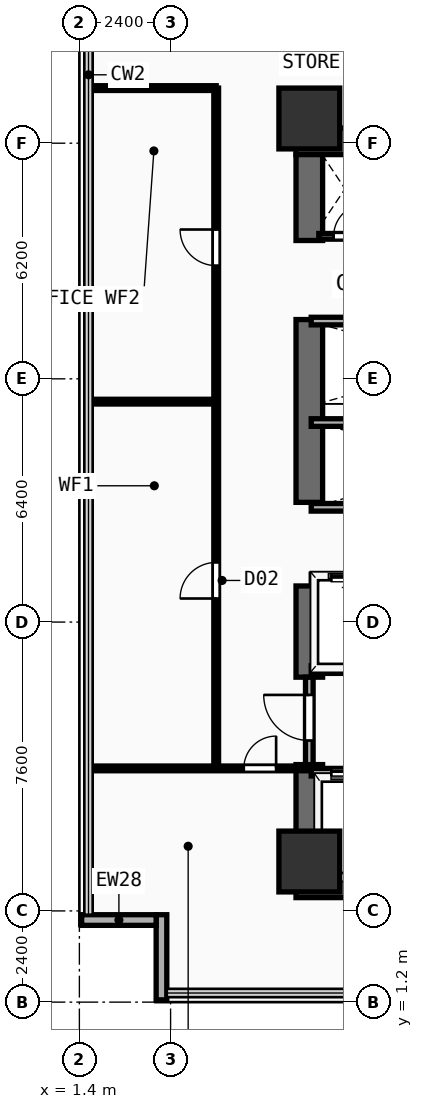
"""IFC4 building model, lengths in metres.
Left out: names, types, materials, properties, quantities, classifications, styles, units other than length and angle.
Written with IfcOpenShell. Run it as: python <this file> out.ifc"""

import sys

from ifc_helpers import new_model, si_unit, direction, frame, frame_2d, origin, origin_2d, place, context, subcontext, project, spatial, rectangle, extrude, element, fill, save


model = new_model("IFC4")
c1 = context("Model", 3, precision=1e-05, world=origin(), true_north=direction((0.0, 1.0)))
c2 = subcontext(c1, "Body", "Model", "MODEL_VIEW")
j1 = project(units=[si_unit("LENGTHUNIT", "METRE"), si_unit("PLANEANGLEUNIT", "RADIAN")], contexts=[c1])
p1 = place(None, origin())
s1 = spatial("IfcSite", under=j1, at=p1, CompositionType="ELEMENT")
p2 = place(p1, origin())
s2 = spatial("IfcBuilding", under=s1, at=p2, CompositionType="ELEMENT")
p3 = place(p2, frame((0.0, 0.0, 48.6)))
s3 = spatial("IfcBuildingStorey", under=s2, at=p3, CompositionType="ELEMENT", Elevation=48.6)
for number, where, z_axis, x_axis in (
    (1, (7.1, 4.3, 0.0), (0.0, 0.0, 1.0), (1.0, 0.0, 0.0)),
    (2, (7.1, 23.85, 0.0), (0.0, 0.0, 1.0), (1.0, 0.0, 0.0)),
):
    element("IfcWall", number, at=place(p3, frame(where, z_axis=z_axis, x_axis=x_axis)), inside=s3, PredefinedType="SHEAR", context=c2, shape_type="SweptSolid", body=[
        extrude(rectangle(XDim=14.05, YDim=0.7, at=frame_2d((7.025, 0.0))), origin(), (0.0, 0.0, 1.0), 3.54),
    ])
p4 = place(p3, frame((7.45, 4.65, 0.0), z_axis=(0.0, 0.0, 1.0), x_axis=(0.0, 1.0, 0.0)))
e3 = element("IfcWall", 3, at=p4, inside=s3, PredefinedType="SHEAR", context=c2, shape_type="SweptSolid", body=[
    extrude(rectangle(XDim=2.8, YDim=0.7, at=frame_2d((1.4, 0.0))), origin(), (0.0, 0.0, 1.0), 3.54),
])
p5 = place(p3, frame((7.45, 9.75, 0.0), z_axis=(0.0, 0.0, 1.0), x_axis=(0.0, 1.0, 0.0)))
e4 = element("IfcWall", 4, at=p5, inside=s3, PredefinedType="SHEAR", context=c2, shape_type="SweptSolid", body=[
    extrude(rectangle(XDim=2.4, YDim=0.7, at=frame_2d((1.2, 0.0))), origin(), (0.0, 0.0, 1.0), 3.54),
])
p6 = place(p3, frame((7.45, 14.35, 0.0), z_axis=(0.0, 0.0, 1.0), x_axis=(0.0, 1.0, 0.0)))
e5 = element("IfcWall", 5, at=p6, inside=s3, PredefinedType="SHEAR", context=c2, shape_type="SweptSolid", body=[
    extrude(rectangle(XDim=4.81, YDim=0.7, at=frame_2d((2.405, 0.0))), origin(), (0.0, 0.0, 1.0), 3.54),
])
p7 = place(p3, frame((7.45, 21.24, 0.0), z_axis=(0.0, 0.0, 1.0), x_axis=(0.0, 1.0, 0.0)))
e6 = element("IfcWall", 6, at=p7, inside=s3, PredefinedType="SHEAR", context=c2, shape_type="SweptSolid", body=[
    extrude(rectangle(XDim=2.26, YDim=0.7, at=frame_2d((1.13, 0.0))), origin(), (0.0, 0.0, 1.0), 3.54),
])
for number, where, z_axis, x_axis in (
    (7, (7.45, 4.9, 0.0), (0.0, 0.0, 1.0), (1.0, 0.0, 0.0)),
    (8, (7.45, 24.45, 0.0), (0.0, 0.0, 1.0), (1.0, 0.0, 0.0)),
):
    element("IfcColumn", number, at=place(p3, frame(where, z_axis=z_axis, x_axis=x_axis)), inside=s3, PredefinedType="COLUMN", context=c2, shape_type="SweptSolid", body=[
        extrude(rectangle(XDim=1.6, YDim=1.6, at=origin_2d()), origin(), (0.0, 0.0, 1.0), 3.54),
    ])
p8 = place(p3, frame((3.56, 1.26, 0.0), z_axis=(0.0, 0.0, 1.0), x_axis=(0.0, 1.0, 0.0)))
e9 = element("IfcWall", 9, at=p8, inside=s3, PredefinedType="SOLIDWALL", context=c2, shape_type="SweptSolid", body=[
    extrude(rectangle(XDim=2.24, YDim=0.28, at=frame_2d((1.12, 0.0))), origin(), (0.0, 0.0, 1.0), 3.54),
])
p9 = place(p3, frame((1.46, 3.36, 0.0), z_axis=(0.0, 0.0, 1.0), x_axis=(1.0, 0.0, 0.0)))
e10 = element("IfcWall", 10, at=p9, inside=s3, PredefinedType="SOLIDWALL", context=c2, shape_type="SweptSolid", body=[
    extrude(rectangle(XDim=1.96, YDim=0.28, at=frame_2d((0.98, 0.0))), origin(), (0.0, 0.0, 1.0), 3.54),
])
p10 = place(p3, frame((7.5, 7.25, 0.0), z_axis=(0.0, 0.0, 1.0), x_axis=(1.0, 0.0, 0.0)))
e11 = element("IfcWall", 11, at=p10, inside=s3, PredefinedType="PARTITIONING", context=c2, shape_type="SweptSolid", body=[
    extrude(rectangle(XDim=8.35, YDim=0.2, at=frame_2d((4.175, 0.0))), origin(), (0.0, 0.0, 1.0), 3.54),
])
p11 = place(p10, frame((0.53, 0.0, 0.0)))
e12 = element("IfcOpeningElement", 12, at=p11, cuts=e11, PredefinedType="OPENING", context=c2, shape_type="SweptSolid", body=[
    extrude(rectangle(XDim=1.1, YDim=2.2, at=frame_2d((0.55, 1.1))), frame((0.0, 0.11, 0.0), z_axis=(0.0, -1.0, 0.0), x_axis=(1.0, 0.0, 0.0)), (0.0, 0.0, 1.0), 0.22),
])
p12 = place(p10, frame((2.37, 0.0, 0.0)))
e13 = element("IfcOpeningElement", 13, at=p12, cuts=e11, PredefinedType="OPENING", context=c2, shape_type="SweptSolid", body=[
    extrude(rectangle(XDim=1.1, YDim=2.2, at=frame_2d((0.55, 1.1))), frame((0.0, 0.11, 0.0), z_axis=(0.0, -1.0, 0.0), x_axis=(1.0, 0.0, 0.0)), (0.0, 0.0, 1.0), 0.22),
])
p13 = place(p10, frame((4.33, 0.0, 0.0)))
e14 = element("IfcOpeningElement", 14, at=p13, cuts=e11, PredefinedType="OPENING", context=c2, shape_type="SweptSolid", body=[
    extrude(rectangle(XDim=1.1, YDim=2.2, at=frame_2d((0.55, 1.1))), frame((0.0, 0.11, 0.0), z_axis=(0.0, -1.0, 0.0), x_axis=(1.0, 0.0, 0.0)), (0.0, 0.0, 1.0), 0.22),
])
p14 = place(p10, frame((6.5, 0.0, 0.0)))
e15 = element("IfcOpeningElement", 15, at=p14, cuts=e11, PredefinedType="OPENING", context=c2, shape_type="SweptSolid", body=[
    extrude(rectangle(XDim=1.1, YDim=2.2, at=frame_2d((0.55, 1.1))), frame((0.0, 0.11, 0.0), z_axis=(0.0, -1.0, 0.0), x_axis=(1.0, 0.0, 0.0)), (0.0, 0.0, 1.0), 0.22),
])
p15 = place(p3, frame((7.5, 9.95, 0.0), z_axis=(0.0, 0.0, 1.0), x_axis=(1.0, 0.0, 0.0)))
e16 = element("IfcWall", 16, at=p15, inside=s3, PredefinedType="PARTITIONING", context=c2, shape_type="SweptSolid", body=[
    extrude(rectangle(XDim=8.35, YDim=0.2, at=frame_2d((4.175, 0.0))), origin(), (0.0, 0.0, 1.0), 3.54),
])
p16 = place(p3, frame((7.45, 7.45, 0.0), z_axis=(0.0, 0.0, 1.0), x_axis=(0.0, 1.0, 0.0)))
e17 = element("IfcWall", 17, at=p16, inside=s3, PredefinedType="PARTITIONING", context=c2, shape_type="SweptSolid", body=[
    extrude(rectangle(XDim=2.3, YDim=0.2, at=frame_2d((1.15, 0.0))), origin(), (0.0, 0.0, 1.0), 2.52),
])
p17 = place(p16, frame((0.633, 0.0, 0.0)))
e18 = element("IfcOpeningElement", 18, at=p17, cuts=e17, PredefinedType="OPENING", context=c2, shape_type="SweptSolid", body=[
    extrude(rectangle(XDim=1.2, YDim=2.25, at=frame_2d((0.6, 1.125))), frame((0.0, 0.11, 0.0), z_axis=(0.0, -1.0, 0.0), x_axis=(1.0, 0.0, 0.0)), (0.0, 0.0, 1.0), 0.22),
])
p18 = place(p3, frame((7.5, 12.36, 0.0), z_axis=(0.0, 0.0, 1.0), x_axis=(1.0, 0.0, 0.0)))
e19 = element("IfcWall", 19, at=p18, inside=s3, PredefinedType="PARTITIONING", context=c2, shape_type="SweptSolid", body=[
    extrude(rectangle(XDim=7.85, YDim=0.2, at=frame_2d((3.925, 0.0))), origin(), (0.0, 0.0, 1.0), 3.54),
])
p19 = place(p18, frame((0.53, 0.0, 0.0)))
e20 = element("IfcOpeningElement", 20, at=p19, cuts=e19, PredefinedType="OPENING", context=c2, shape_type="SweptSolid", body=[
    extrude(rectangle(XDim=1.1, YDim=2.2, at=frame_2d((0.55, 1.1))), frame((0.0, 0.11, 0.0), z_axis=(0.0, -1.0, 0.0), x_axis=(1.0, 0.0, 0.0)), (0.0, 0.0, 1.0), 0.22),
])
p20 = place(p18, frame((2.42, 0.0, 0.0)))
e21 = element("IfcOpeningElement", 21, at=p20, cuts=e19, PredefinedType="OPENING", context=c2, shape_type="SweptSolid", body=[
    extrude(rectangle(XDim=1.1, YDim=2.2, at=frame_2d((0.55, 1.1))), frame((0.0, 0.11, 0.0), z_axis=(0.0, -1.0, 0.0), x_axis=(1.0, 0.0, 0.0)), (0.0, 0.0, 1.0), 0.22),
])
p21 = place(p18, frame((4.31, 0.0, 0.0)))
e22 = element("IfcOpeningElement", 22, at=p21, cuts=e19, PredefinedType="OPENING", context=c2, shape_type="SweptSolid", body=[
    extrude(rectangle(XDim=1.1, YDim=2.2, at=frame_2d((0.55, 1.1))), frame((0.0, 0.11, 0.0), z_axis=(0.0, -1.0, 0.0), x_axis=(1.0, 0.0, 0.0)), (0.0, 0.0, 1.0), 0.22),
])
p22 = place(p18, frame((6.2, 0.0, 0.0)))
e23 = element("IfcOpeningElement", 23, at=p22, cuts=e19, PredefinedType="OPENING", context=c2, shape_type="SweptSolid", body=[
    extrude(rectangle(XDim=1.1, YDim=2.2, at=frame_2d((0.55, 1.1))), frame((0.0, 0.11, 0.0), z_axis=(0.0, -1.0, 0.0), x_axis=(1.0, 0.0, 0.0)), (0.0, 0.0, 1.0), 0.22),
])
for number, where, z_axis, x_axis in (
    (24, (7.5, 14.22, 0.0), (0.0, 0.0, 1.0), (1.0, 0.0, 0.0)),
    (25, (7.5, 16.45, 0.0), (0.0, 0.0, 1.0), (1.0, 0.0, 0.0)),
    (26, (7.5, 19.12, 0.0), (0.0, 0.0, 1.0), (1.0, 0.0, 0.0)),
):
    element("IfcWall", number, at=place(p3, frame(where, z_axis=z_axis, x_axis=x_axis)), inside=s3, PredefinedType="PARTITIONING", context=c2, shape_type="SweptSolid", body=[
        extrude(rectangle(XDim=7.85, YDim=0.2, at=frame_2d((3.925, 0.0))), origin(), (0.0, 0.0, 1.0), 3.54),
    ])
p23 = place(p3, frame((7.7, 21.35, 0.0), z_axis=(0.0, 0.0, 1.0), x_axis=(1.0, 0.0, 0.0)))
e27 = element("IfcWall", 27, at=p23, inside=s3, PredefinedType="PARTITIONING", context=c2, shape_type="SweptSolid", body=[
    extrude(rectangle(XDim=1.55, YDim=0.15, at=frame_2d((0.775, 0.0))), origin(), (0.0, 0.0, 1.0), 3.54),
])
p24 = place(p23, frame((0.39, 0.0, 0.0)))
e28 = element("IfcOpeningElement", 28, at=p24, cuts=e27, PredefinedType="OPENING", context=c2, shape_type="SweptSolid", body=[
    extrude(rectangle(XDim=0.85, YDim=2.15, at=frame_2d((0.425, 1.075))), frame((0.0, 0.085, 0.0), z_axis=(0.0, -1.0, 0.0), x_axis=(1.0, 0.0, 0.0)), (0.0, 0.0, 1.0), 0.17),
])
p25 = place(p3, frame((1.64, 7.35, 0.0), z_axis=(0.0, 0.0, 1.0), x_axis=(1.0, 0.0, 0.0)))
e29 = element("IfcWall", 29, at=p25, inside=s3, PredefinedType="PARTITIONING", context=c2, shape_type="SweptSolid", body=[
    extrude(rectangle(XDim=5.76, YDim=0.125, at=frame_2d((2.88, 0.0))), origin(), (0.0, 0.0, 1.0), 3.54),
])
p26 = place(p25, frame((4.087, 0.0, 0.0)))
e30 = element("IfcOpeningElement", 30, at=p26, cuts=e29, PredefinedType="OPENING", context=c2, shape_type="SweptSolid", body=[
    extrude(rectangle(XDim=0.85, YDim=2.15, at=frame_2d((0.425, 1.075))), frame((0.0, 0.073, 0.0), z_axis=(0.0, -1.0, 0.0), x_axis=(1.0, 0.0, 0.0)), (0.0, 0.0, 1.0), 0.145),
])
p27 = place(p3, frame((5.0, 7.5, 0.0), z_axis=(0.0, 0.0, 1.0), x_axis=(0.0, 1.0, 0.0)))
e31 = element("IfcWall", 31, at=p27, inside=s3, PredefinedType="PARTITIONING", context=c2, shape_type="SweptSolid", body=[
    extrude(rectangle(XDim=17.75, YDim=0.125, at=frame_2d((8.875, 0.0))), origin(), (0.0, 0.0, 1.0), 3.54),
])
p28 = place(p27, frame((4.32, 0.0, 0.0)))
e32 = element("IfcOpeningElement", 32, at=p28, cuts=e31, PredefinedType="OPENING", context=c2, shape_type="SweptSolid", body=[
    extrude(rectangle(XDim=0.95, YDim=2.15, at=frame_2d((0.475, 1.075))), frame((0.0, 0.073, 0.0), z_axis=(0.0, -1.0, 0.0), x_axis=(1.0, 0.0, 0.0)), (0.0, 0.0, 1.0), 0.145),
])
p29 = place(p27, frame((13.079, 0.0, 0.0)))
e33 = element("IfcOpeningElement", 33, at=p29, cuts=e31, PredefinedType="OPENING", context=c2, shape_type="SweptSolid", body=[
    extrude(rectangle(XDim=0.95, YDim=2.15, at=frame_2d((0.475, 1.075))), frame((0.0, 0.073, 0.0), z_axis=(0.0, -1.0, 0.0), x_axis=(1.0, 0.0, 0.0)), (0.0, 0.0, 1.0), 0.145),
])
for number, where, z_axis, x_axis in (
    (34, (1.64, 25.25, 0.0), (0.0, 0.0, 1.0), (1.0, 0.0, 0.0)),
    (35, (1.64, 17.0, 0.0), (0.0, 0.0, 1.0), (1.0, 0.0, 0.0)),
):
    element("IfcWall", number, at=place(p3, frame(where, z_axis=z_axis, x_axis=x_axis)), inside=s3, PredefinedType="PARTITIONING", context=c2, shape_type="SweptSolid", body=[
        extrude(rectangle(XDim=3.36, YDim=0.125, at=frame_2d((1.68, 0.0))), origin(), (0.0, 0.0, 1.0), 3.54),
    ])
p30 = place(p11, origin())
e36 = element("IfcDoor", 36, at=p30, inside=s3, OperationType="SLIDING_TO_LEFT", PredefinedType="DOOR", context=c2, shape_type="SweptSolid", body=[
    extrude(rectangle(XDim=1.1, YDim=2.2, at=frame_2d((0.55, 1.1))), frame((0.0, 0.025, 0.0), z_axis=(0.0, -1.0, 0.0), x_axis=(1.0, 0.0, 0.0)), (0.0, 0.0, 1.0), 0.05),
])
fill(e12, e36)
p31 = place(p17, frame((1.2, 0.0, 0.0), z_axis=(0.0, 0.0, 1.0), x_axis=(-1.0, 0.0, 0.0)))
e37 = element("IfcDoor", 37, at=p31, inside=s3, OperationType="SINGLE_SWING_LEFT", PredefinedType="DOOR", context=c2, shape_type="SweptSolid", body=[
    extrude(rectangle(XDim=1.2, YDim=2.25, at=frame_2d((0.6, 1.125))), frame((0.0, 0.025, 0.0), z_axis=(0.0, -1.0, 0.0), x_axis=(1.0, 0.0, 0.0)), (0.0, 0.0, 1.0), 0.05),
])
fill(e18, e37)
p32 = place(p19, origin())
e38 = element("IfcDoor", 38, at=p32, inside=s3, OperationType="SLIDING_TO_LEFT", PredefinedType="DOOR", context=c2, shape_type="SweptSolid", body=[
    extrude(rectangle(XDim=1.1, YDim=2.2, at=frame_2d((0.55, 1.1))), frame((0.0, 0.025, 0.0), z_axis=(0.0, -1.0, 0.0), x_axis=(1.0, 0.0, 0.0)), (0.0, 0.0, 1.0), 0.05),
])
fill(e20, e38)
p33 = place(p24, origin())
e39 = element("IfcDoor", 39, at=p33, inside=s3, OperationType="SINGLE_SWING_RIGHT", PredefinedType="DOOR", context=c2, shape_type="SweptSolid", body=[
    extrude(rectangle(XDim=0.85, YDim=2.15, at=frame_2d((0.425, 1.075))), frame((0.0, 0.025, 0.0), z_axis=(0.0, -1.0, 0.0), x_axis=(1.0, 0.0, 0.0)), (0.0, 0.0, 1.0), 0.05),
])
fill(e28, e39)
p34 = place(p26, origin())
e40 = element("IfcDoor", 40, at=p34, inside=s3, OperationType="SINGLE_SWING_RIGHT", PredefinedType="DOOR", context=c2, shape_type="SweptSolid", body=[
    extrude(rectangle(XDim=0.85, YDim=2.15, at=frame_2d((0.425, 1.075))), frame((0.0, 0.025, 0.0), z_axis=(0.0, -1.0, 0.0), x_axis=(1.0, 0.0, 0.0)), (0.0, 0.0, 1.0), 0.05),
])
fill(e30, e40)
p35 = place(p28, origin())
e41 = element("IfcDoor", 41, at=p35, inside=s3, OperationType="SINGLE_SWING_LEFT", PredefinedType="DOOR", context=c2, shape_type="SweptSolid", body=[
    extrude(rectangle(XDim=0.95, YDim=2.15, at=frame_2d((0.475, 1.075))), frame((0.0, 0.025, 0.0), z_axis=(0.0, -1.0, 0.0), x_axis=(1.0, 0.0, 0.0)), (0.0, 0.0, 1.0), 0.05),
])
fill(e32, e41)
p36 = place(p29, origin())
e42 = element("IfcDoor", 42, at=p36, inside=s3, OperationType="SINGLE_SWING_RIGHT", PredefinedType="DOOR", context=c2, shape_type="SweptSolid", body=[
    extrude(rectangle(XDim=0.95, YDim=2.15, at=frame_2d((0.475, 1.075))), frame((0.0, 0.025, 0.0), z_axis=(0.0, -1.0, 0.0), x_axis=(1.0, 0.0, 0.0)), (0.0, 0.0, 1.0), 0.05),
])
fill(e33, e42)
save(model, sys.argv[1])
